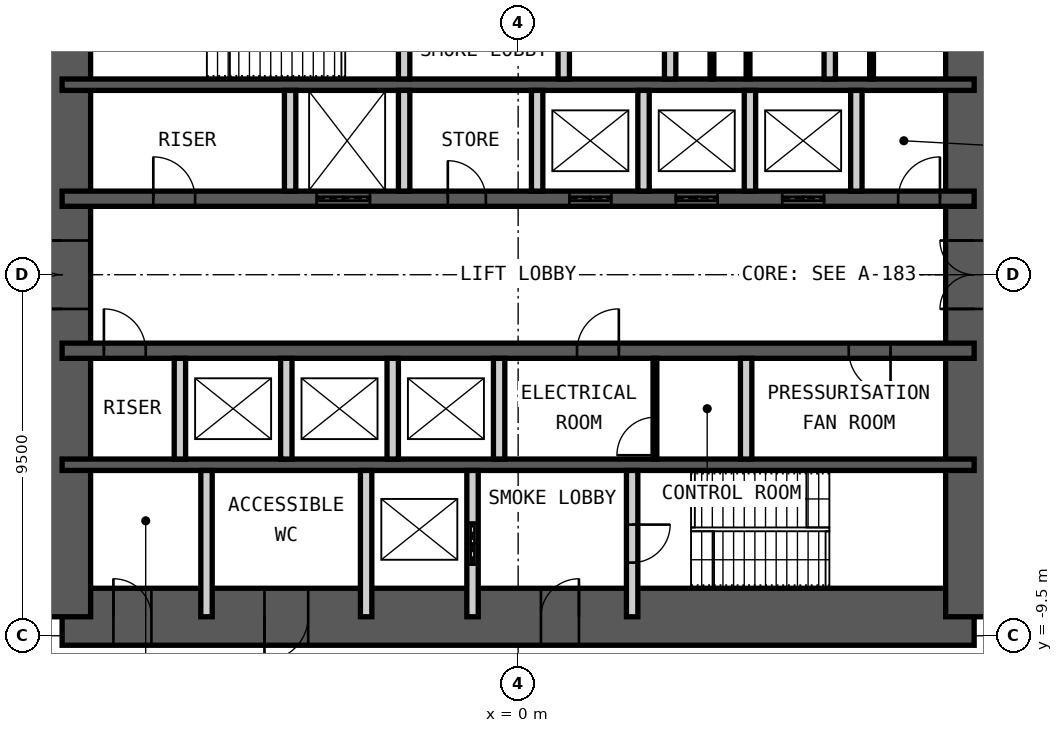
"""IFC4 building model, lengths in metres.
Left out: names, types, materials, properties, quantities, classifications, styles, units other than length and angle.
Written with IfcOpenShell. Run it as: python <this file> out.ifc"""

import sys

from ifc_helpers import new_model, si_unit, direction, frame, frame_2d, origin, place, context, subcontext, project, spatial, rectangle, extrude, element, fill, save


model = new_model("IFC4")
c1 = context("Model", 3, precision=1e-05, world=origin(), true_north=direction((0.0, 1.0)))
c2 = subcontext(c1, "Body", "Model", "MODEL_VIEW")
j1 = project(units=[si_unit("LENGTHUNIT", "METRE"), si_unit("PLANEANGLEUNIT", "RADIAN")], contexts=[c1])
p1 = place(None, origin())
s1 = spatial("IfcSite", under=j1, at=p1, CompositionType="ELEMENT")
p2 = place(p1, origin())
s2 = spatial("IfcBuilding", under=s1, at=p2, CompositionType="ELEMENT")
p3 = place(p2, frame((0.0, 0.0, 82.0)))
s3 = spatial("IfcBuildingStorey", under=s2, at=p3, CompositionType="ELEMENT", Elevation=82.0)
p4 = place(p3, frame((-12.0, -9.0, 0.0), z_axis=(0.0, 0.0, 1.0), x_axis=(1.0, 0.0, 0.0)))
e1 = element("IfcWall", 1, at=p4, inside=s3, PredefinedType="SHEAR", context=c2, shape_type="SweptSolid", body=[
    extrude(rectangle(XDim=24.0, YDim=1.5, at=frame_2d((12.0, 0.0))), origin(), (0.0, 0.0, 1.0), 5.0),
])
p5 = place(p4, frame((1.35, 0.0, 0.0)))
e2 = element("IfcOpeningElement", 2, at=p5, cuts=e1, PredefinedType="OPENING", context=c2, shape_type="SweptSolid", body=[
    extrude(rectangle(XDim=1.0, YDim=2.1, at=frame_2d((0.5, 1.05))), frame((0.0, 0.76, 0.0), z_axis=(0.0, -1.0, 0.0), x_axis=(1.0, 0.0, 0.0)), (0.0, 0.0, 1.0), 1.52),
])
p6 = place(p4, frame((5.325, 0.0, 0.0)))
e3 = element("IfcOpeningElement", 3, at=p6, cuts=e1, PredefinedType="OPENING", context=c2, shape_type="SweptSolid", body=[
    extrude(rectangle(XDim=1.15, YDim=2.1, at=frame_2d((0.575, 1.05))), frame((0.0, 0.76, 0.0), z_axis=(0.0, -1.0, 0.0), x_axis=(1.0, 0.0, 0.0)), (0.0, 0.0, 1.0), 1.52),
])
p7 = place(p4, frame((12.6, 0.0, 0.0)))
e4 = element("IfcOpeningElement", 4, at=p7, cuts=e1, PredefinedType="OPENING", context=c2, shape_type="SweptSolid", body=[
    extrude(rectangle(XDim=1.0, YDim=2.1, at=frame_2d((0.5, 1.05))), frame((0.0, 0.76, 0.0), z_axis=(0.0, -1.0, 0.0), x_axis=(1.0, 0.0, 0.0)), (0.0, 0.0, 1.0), 1.52),
])
p8 = place(p3, frame((12.0, -9.0, 0.0), z_axis=(0.0, 0.0, 1.0), x_axis=(0.0, 1.0, 0.0)))
e5 = element("IfcWall", 5, at=p8, inside=s3, PredefinedType="SHEAR", context=c2, shape_type="SweptSolid", body=[
    extrude(rectangle(XDim=18.0, YDim=1.5, at=frame_2d((9.0, 0.0))), origin(), (0.0, 0.0, 1.0), 5.0),
])
p9 = place(p8, frame((8.1, 0.0, 0.0)))
e6 = element("IfcOpeningElement", 6, at=p9, cuts=e5, PredefinedType="OPENING", context=c2, shape_type="SweptSolid", body=[
    extrude(rectangle(XDim=1.8, YDim=2.1, at=frame_2d((0.9, 1.05))), frame((0.0, 0.76, 0.0), z_axis=(0.0, -1.0, 0.0), x_axis=(1.0, 0.0, 0.0)), (0.0, 0.0, 1.0), 1.52),
])
p10 = place(p3, frame((-12.0, -9.0, 0.0), z_axis=(0.0, 0.0, 1.0), x_axis=(0.0, 1.0, 0.0)))
e7 = element("IfcWall", 7, at=p10, inside=s3, PredefinedType="SHEAR", context=c2, shape_type="SweptSolid", body=[
    extrude(rectangle(XDim=18.0, YDim=1.5, at=frame_2d((9.0, 0.0))), origin(), (0.0, 0.0, 1.0), 5.0),
])
p11 = place(p10, frame((8.1, 0.0, 0.0)))
e8 = element("IfcOpeningElement", 8, at=p11, cuts=e7, PredefinedType="OPENING", context=c2, shape_type="SweptSolid", body=[
    extrude(rectangle(XDim=1.8, YDim=2.1, at=frame_2d((0.9, 1.05))), frame((0.0, 0.76, 0.0), z_axis=(0.0, -1.0, 0.0), x_axis=(1.0, 0.0, 0.0)), (0.0, 0.0, 1.0), 1.52),
])
p12 = place(p3, frame((-12.0, 5.0, 0.0), z_axis=(0.0, 0.0, 1.0), x_axis=(1.0, 0.0, 0.0)))
e9 = element("IfcWall", 9, at=p12, inside=s3, PredefinedType="SHEAR", context=c2, shape_type="SweptSolid", body=[
    extrude(rectangle(XDim=24.0, YDim=0.3, at=frame_2d((12.0, 0.0))), origin(), (0.0, 0.0, 1.0), 5.0),
])
p13 = place(p3, frame((-12.0, 2.0, 0.0), z_axis=(0.0, 0.0, 1.0), x_axis=(1.0, 0.0, 0.0)))
e10 = element("IfcWall", 10, at=p13, inside=s3, PredefinedType="SHEAR", context=c2, shape_type="SweptSolid", body=[
    extrude(rectangle(XDim=24.0, YDim=0.4, at=frame_2d((12.0, 0.0))), origin(), (0.0, 0.0, 1.0), 5.0),
])
p14 = place(p13, frame((2.4, 0.0, 0.0)))
e11 = element("IfcOpeningElement", 11, at=p14, cuts=e10, PredefinedType="OPENING", context=c2, shape_type="SweptSolid", body=[
    extrude(rectangle(XDim=1.1, YDim=2.1, at=frame_2d((0.55, 1.05))), frame((0.0, 0.21, 0.0), z_axis=(0.0, -1.0, 0.0), x_axis=(1.0, 0.0, 0.0)), (0.0, 0.0, 1.0), 0.42),
])
p15 = place(p13, frame((22.0, 0.0, 0.0)))
e12 = element("IfcOpeningElement", 12, at=p15, cuts=e10, PredefinedType="OPENING", context=c2, shape_type="SweptSolid", body=[
    extrude(rectangle(XDim=1.1, YDim=2.1, at=frame_2d((0.55, 1.05))), frame((0.0, 0.21, 0.0), z_axis=(0.0, -1.0, 0.0), x_axis=(1.0, 0.0, 0.0)), (0.0, 0.0, 1.0), 0.42),
])
p16 = place(p13, frame((10.15, 0.0, 0.0)))
e13 = element("IfcOpeningElement", 13, at=p16, cuts=e10, PredefinedType="OPENING", context=c2, shape_type="SweptSolid", body=[
    extrude(rectangle(XDim=1.0, YDim=2.1, at=frame_2d((0.5, 1.05))), frame((0.0, 0.21, 0.0), z_axis=(0.0, -1.0, 0.0), x_axis=(1.0, 0.0, 0.0)), (0.0, 0.0, 1.0), 0.42),
])
p17 = place(p13, frame((6.7, 0.0, 0.0)))
e14 = element("IfcOpeningElement", 14, at=p17, cuts=e10, PredefinedType="OPENING", context=c2, shape_type="SweptSolid", body=[
    extrude(rectangle(XDim=1.4, YDim=2.4, at=frame_2d((0.7, 1.2))), frame((0.0, 0.21, 0.0), z_axis=(0.0, -1.0, 0.0), x_axis=(1.0, 0.0, 0.0)), (0.0, 0.0, 1.0), 0.42),
])
p18 = place(p13, frame((13.35, 0.0, 0.0)))
e15 = element("IfcOpeningElement", 15, at=p18, cuts=e10, PredefinedType="OPENING", context=c2, shape_type="SweptSolid", body=[
    extrude(rectangle(XDim=1.1, YDim=2.4, at=frame_2d((0.55, 1.2))), frame((0.0, 0.21, 0.0), z_axis=(0.0, -1.0, 0.0), x_axis=(1.0, 0.0, 0.0)), (0.0, 0.0, 1.0), 0.42),
])
p19 = place(p13, frame((16.15, 0.0, 0.0)))
e16 = element("IfcOpeningElement", 16, at=p19, cuts=e10, PredefinedType="OPENING", context=c2, shape_type="SweptSolid", body=[
    extrude(rectangle(XDim=1.1, YDim=2.4, at=frame_2d((0.55, 1.2))), frame((0.0, 0.21, 0.0), z_axis=(0.0, -1.0, 0.0), x_axis=(1.0, 0.0, 0.0)), (0.0, 0.0, 1.0), 0.42),
])
p20 = place(p13, frame((18.95, 0.0, 0.0)))
e17 = element("IfcOpeningElement", 17, at=p20, cuts=e10, PredefinedType="OPENING", context=c2, shape_type="SweptSolid", body=[
    extrude(rectangle(XDim=1.1, YDim=2.4, at=frame_2d((0.55, 1.2))), frame((0.0, 0.21, 0.0), z_axis=(0.0, -1.0, 0.0), x_axis=(1.0, 0.0, 0.0)), (0.0, 0.0, 1.0), 0.42),
])
p21 = place(p3, frame((-12.0, -2.0, 0.0), z_axis=(0.0, 0.0, 1.0), x_axis=(1.0, 0.0, 0.0)))
e18 = element("IfcWall", 18, at=p21, inside=s3, PredefinedType="SHEAR", context=c2, shape_type="SweptSolid", body=[
    extrude(rectangle(XDim=24.0, YDim=0.4, at=frame_2d((12.0, 0.0))), origin(), (0.0, 0.0, 1.0), 5.0),
])
p22 = place(p21, frame((1.1, 0.0, 0.0)))
e19 = element("IfcOpeningElement", 19, at=p22, cuts=e18, PredefinedType="OPENING", context=c2, shape_type="SweptSolid", body=[
    extrude(rectangle(XDim=1.1, YDim=2.1, at=frame_2d((0.55, 1.05))), frame((0.0, 0.21, 0.0), z_axis=(0.0, -1.0, 0.0), x_axis=(1.0, 0.0, 0.0)), (0.0, 0.0, 1.0), 0.42),
])
p23 = place(p21, frame((13.55, 0.0, 0.0)))
e20 = element("IfcOpeningElement", 20, at=p23, cuts=e18, PredefinedType="OPENING", context=c2, shape_type="SweptSolid", body=[
    extrude(rectangle(XDim=1.1, YDim=2.1, at=frame_2d((0.55, 1.05))), frame((0.0, 0.21, 0.0), z_axis=(0.0, -1.0, 0.0), x_axis=(1.0, 0.0, 0.0)), (0.0, 0.0, 1.0), 0.42),
])
p24 = place(p21, frame((20.7, 0.0, 0.0)))
e21 = element("IfcOpeningElement", 21, at=p24, cuts=e18, PredefinedType="OPENING", context=c2, shape_type="SweptSolid", body=[
    extrude(rectangle(XDim=1.1, YDim=2.1, at=frame_2d((0.55, 1.05))), frame((0.0, 0.21, 0.0), z_axis=(0.0, -1.0, 0.0), x_axis=(1.0, 0.0, 0.0)), (0.0, 0.0, 1.0), 0.42),
])
p25 = place(p3, frame((-12.0, -5.0, 0.0), z_axis=(0.0, 0.0, 1.0), x_axis=(1.0, 0.0, 0.0)))
e22 = element("IfcWall", 22, at=p25, inside=s3, PredefinedType="SHEAR", context=c2, shape_type="SweptSolid", body=[
    extrude(rectangle(XDim=24.0, YDim=0.3, at=frame_2d((12.0, 0.0))), origin(), (0.0, 0.0, 1.0), 5.0),
])
p26 = place(p3, frame((-3.0, 5.15, 0.0), z_axis=(0.0, 0.0, 1.0), x_axis=(0.0, 1.0, 0.0)))
e23 = element("IfcWall", 23, at=p26, inside=s3, PredefinedType="PARTITIONING", context=c2, shape_type="SweptSolid", body=[
    extrude(rectangle(XDim=3.85, YDim=0.3, at=frame_2d((1.925, 0.0))), origin(), (0.0, 0.0, 1.0), 4.78),
])
p27 = place(p26, frame((1.425, 0.0, 0.0)))
e24 = element("IfcOpeningElement", 24, at=p27, cuts=e23, PredefinedType="OPENING", context=c2, shape_type="SweptSolid", body=[
    extrude(rectangle(XDim=1.0, YDim=2.1, at=frame_2d((0.5, 1.05))), frame((0.0, 0.16, 0.0), z_axis=(0.0, -1.0, 0.0), x_axis=(1.0, 0.0, 0.0)), (0.0, 0.0, 1.0), 0.32),
])
p28 = place(p3, frame((1.2, 5.15, 0.0), z_axis=(0.0, 0.0, 1.0), x_axis=(0.0, 1.0, 0.0)))
e25 = element("IfcWall", 25, at=p28, inside=s3, PredefinedType="PARTITIONING", context=c2, shape_type="SweptSolid", body=[
    extrude(rectangle(XDim=3.85, YDim=0.3, at=frame_2d((1.925, 0.0))), origin(), (0.0, 0.0, 1.0), 4.78),
])
p29 = place(p28, frame((1.375, 0.0, 0.0)))
e26 = element("IfcOpeningElement", 26, at=p29, cuts=e25, PredefinedType="OPENING", context=c2, shape_type="SweptSolid", body=[
    extrude(rectangle(XDim=1.1, YDim=2.4, at=frame_2d((0.55, 1.2))), frame((0.0, 0.16, 0.0), z_axis=(0.0, -1.0, 0.0), x_axis=(1.0, 0.0, 0.0)), (0.0, 0.0, 1.0), 0.32),
])
for number, where, z_axis, x_axis in (
    (27, (4.0, 5.15, 0.0), (0.0, 0.0, 1.0), (0.0, 1.0, 0.0)),
    (28, (8.2, 5.15, 0.0), (0.0, 0.0, 1.0), (0.0, 1.0, 0.0)),
):
    element("IfcWall", number, at=place(p3, frame(where, z_axis=z_axis, x_axis=x_axis)), inside=s3, PredefinedType="PARTITIONING", context=c2, shape_type="SweptSolid", body=[
        extrude(rectangle(XDim=3.85, YDim=0.3, at=frame_2d((1.925, 0.0))), origin(), (0.0, 0.0, 1.0), 4.78),
    ])
for number, where, z_axis, x_axis in (
    (29, (-6.0, 2.2, 0.0), (0.0, 0.0, 1.0), (0.0, 1.0, 0.0)),
    (30, (-3.0, 2.2, 0.0), (0.0, 0.0, 1.0), (0.0, 1.0, 0.0)),
    (31, (0.5, 2.2, 0.0), (0.0, 0.0, 1.0), (0.0, 1.0, 0.0)),
    (32, (3.3, 2.2, 0.0), (0.0, 0.0, 1.0), (0.0, 1.0, 0.0)),
    (33, (6.1, 2.2, 0.0), (0.0, 0.0, 1.0), (0.0, 1.0, 0.0)),
    (34, (8.9, 2.2, 0.0), (0.0, 0.0, 1.0), (0.0, 1.0, 0.0)),
    (35, (-8.9, -4.85, 0.0), (0.0, 0.0, 1.0), (0.0, 1.0, 0.0)),
    (36, (-6.1, -4.85, 0.0), (0.0, 0.0, 1.0), (0.0, 1.0, 0.0)),
    (37, (-3.3, -4.85, 0.0), (0.0, 0.0, 1.0), (0.0, 1.0, 0.0)),
    (38, (-0.5, -4.85, 0.0), (0.0, 0.0, 1.0), (0.0, 1.0, 0.0)),
    (39, (6.0, -4.85, 0.0), (0.0, 0.0, 1.0), (0.0, 1.0, 0.0)),
):
    element("IfcWall", number, at=place(p3, frame(where, z_axis=z_axis, x_axis=x_axis)), inside=s3, PredefinedType="PARTITIONING", context=c2, shape_type="SweptSolid", body=[
        extrude(rectangle(XDim=2.65, YDim=0.3, at=frame_2d((1.325, 0.0))), origin(), (0.0, 0.0, 1.0), 4.78),
    ])
for number, where, z_axis, x_axis in (
    (40, (-8.2, -9.0, 0.0), (0.0, 0.0, 1.0), (0.0, 1.0, 0.0)),
    (41, (-4.0, -9.0, 0.0), (0.0, 0.0, 1.0), (0.0, 1.0, 0.0)),
):
    element("IfcWall", number, at=place(p3, frame(where, z_axis=z_axis, x_axis=x_axis)), inside=s3, PredefinedType="PARTITIONING", context=c2, shape_type="SweptSolid", body=[
        extrude(rectangle(XDim=3.85, YDim=0.3, at=frame_2d((1.925, 0.0))), origin(), (0.0, 0.0, 1.0), 4.78),
    ])
p30 = place(p3, frame((-1.2, -9.0, 0.0), z_axis=(0.0, 0.0, 1.0), x_axis=(0.0, 1.0, 0.0)))
e42 = element("IfcWall", 42, at=p30, inside=s3, PredefinedType="PARTITIONING", context=c2, shape_type="SweptSolid", body=[
    extrude(rectangle(XDim=3.85, YDim=0.3, at=frame_2d((1.925, 0.0))), origin(), (0.0, 0.0, 1.0), 4.78),
])
p31 = place(p30, frame((1.375, 0.0, 0.0)))
e43 = element("IfcOpeningElement", 43, at=p31, cuts=e42, PredefinedType="OPENING", context=c2, shape_type="SweptSolid", body=[
    extrude(rectangle(XDim=1.1, YDim=2.4, at=frame_2d((0.55, 1.2))), frame((0.0, 0.16, 0.0), z_axis=(0.0, -1.0, 0.0), x_axis=(1.0, 0.0, 0.0)), (0.0, 0.0, 1.0), 0.32),
])
p32 = place(p3, frame((3.0, -9.0, 0.0), z_axis=(0.0, 0.0, 1.0), x_axis=(0.0, 1.0, 0.0)))
e44 = element("IfcWall", 44, at=p32, inside=s3, PredefinedType="PARTITIONING", context=c2, shape_type="SweptSolid", body=[
    extrude(rectangle(XDim=3.85, YDim=0.3, at=frame_2d((1.925, 0.0))), origin(), (0.0, 0.0, 1.0), 4.78),
])
p33 = place(p32, frame((1.425, 0.0, 0.0)))
e45 = element("IfcOpeningElement", 45, at=p33, cuts=e44, PredefinedType="OPENING", context=c2, shape_type="SweptSolid", body=[
    extrude(rectangle(XDim=1.0, YDim=2.1, at=frame_2d((0.5, 1.05))), frame((0.0, 0.16, 0.0), z_axis=(0.0, -1.0, 0.0), x_axis=(1.0, 0.0, 0.0)), (0.0, 0.0, 1.0), 0.32),
])
p34 = place(p3, frame((3.6, -4.85, 0.0), z_axis=(0.0, 0.0, 1.0), x_axis=(0.0, 1.0, 0.0)))
e46 = element("IfcWall", 46, at=p34, inside=s3, PredefinedType="PARTITIONING", context=c2, shape_type="SweptSolid", body=[
    extrude(rectangle(XDim=2.65, YDim=0.1, at=frame_2d((1.325, 0.0))), origin(), (0.0, 0.0, 1.0), 4.78),
])
p35 = place(p34, frame((0.1, 0.0, 0.0)))
e47 = element("IfcOpeningElement", 47, at=p35, cuts=e46, PredefinedType="OPENING", context=c2, shape_type="SweptSolid", body=[
    extrude(rectangle(XDim=1.0, YDim=2.4, at=frame_2d((0.5, 1.2))), frame((0.0, 0.06, 0.0), z_axis=(0.0, -1.0, 0.0), x_axis=(1.0, 0.0, 0.0)), (0.0, 0.0, 1.0), 0.12),
])
for number, where, z_axis, x_axis in (
    (48, (5.1, 5.15, 0.0), (0.0, 0.0, 1.0), (0.0, 1.0, 0.0)),
    (49, (6.05, 5.15, 0.0), (0.0, 0.0, 1.0), (0.0, 1.0, 0.0)),
    (50, (9.3, 5.15, 0.0), (0.0, 0.0, 1.0), (0.0, 1.0, 0.0)),
):
    element("IfcWall", number, at=place(p3, frame(where, z_axis=z_axis, x_axis=x_axis)), inside=s3, PredefinedType="PARTITIONING", context=c2, shape_type="SweptSolid", body=[
        extrude(rectangle(XDim=1.5, YDim=0.1, at=frame_2d((0.75, 0.0))), origin(), (0.0, 0.0, 1.0), 2.1),
    ])
p36 = place(p5, origin())
e51 = element("IfcDoor", 51, at=p36, inside=s3, OperationType="SINGLE_SWING_RIGHT", PredefinedType="DOOR", context=c2, shape_type="SweptSolid", body=[
    extrude(rectangle(XDim=1.0, YDim=2.1, at=frame_2d((0.5, 1.05))), frame((0.0, 0.025, 0.0), z_axis=(0.0, -1.0, 0.0), x_axis=(1.0, 0.0, 0.0)), (0.0, 0.0, 1.0), 0.05),
])
fill(e2, e51)
p37 = place(p6, origin())
e52 = element("IfcDoor", 52, at=p37, inside=s3, OperationType="SINGLE_SWING_LEFT", PredefinedType="DOOR", context=c2, shape_type="SweptSolid", body=[
    extrude(rectangle(XDim=1.15, YDim=2.1, at=frame_2d((0.575, 1.05))), frame((0.0, 0.025, 0.0), z_axis=(0.0, -1.0, 0.0), x_axis=(1.0, 0.0, 0.0)), (0.0, 0.0, 1.0), 0.05),
])
fill(e3, e52)
p38 = place(p7, origin())
e53 = element("IfcDoor", 53, at=p38, inside=s3, OperationType="SINGLE_SWING_LEFT", PredefinedType="DOOR", context=c2, shape_type="SweptSolid", body=[
    extrude(rectangle(XDim=1.0, YDim=2.1, at=frame_2d((0.5, 1.05))), frame((0.0, 0.025, 0.0), z_axis=(0.0, -1.0, 0.0), x_axis=(1.0, 0.0, 0.0)), (0.0, 0.0, 1.0), 0.05),
])
fill(e4, e53)
p39 = place(p33, origin())
e54 = element("IfcDoor", 54, at=p39, inside=s3, OperationType="SINGLE_SWING_RIGHT", PredefinedType="DOOR", context=c2, shape_type="SweptSolid", body=[
    extrude(rectangle(XDim=1.0, YDim=2.1, at=frame_2d((0.5, 1.05))), frame((0.0, 0.025, 0.0), z_axis=(0.0, -1.0, 0.0), x_axis=(1.0, 0.0, 0.0)), (0.0, 0.0, 1.0), 0.05),
])
fill(e45, e54)
p40 = place(p14, origin())
e55 = element("IfcDoor", 55, at=p40, inside=s3, OperationType="SINGLE_SWING_RIGHT", PredefinedType="DOOR", context=c2, shape_type="SweptSolid", body=[
    extrude(rectangle(XDim=1.1, YDim=2.1, at=frame_2d((0.55, 1.05))), frame((0.0, 0.025, 0.0), z_axis=(0.0, -1.0, 0.0), x_axis=(1.0, 0.0, 0.0)), (0.0, 0.0, 1.0), 0.05),
])
fill(e11, e55)
p41 = place(p22, origin())
e56 = element("IfcDoor", 56, at=p41, inside=s3, OperationType="SINGLE_SWING_RIGHT", PredefinedType="DOOR", context=c2, shape_type="SweptSolid", body=[
    extrude(rectangle(XDim=1.1, YDim=2.1, at=frame_2d((0.55, 1.05))), frame((0.0, 0.025, 0.0), z_axis=(0.0, -1.0, 0.0), x_axis=(1.0, 0.0, 0.0)), (0.0, 0.0, 1.0), 0.05),
])
fill(e19, e56)
p42 = place(p15, origin())
e57 = element("IfcDoor", 57, at=p42, inside=s3, OperationType="SINGLE_SWING_LEFT", PredefinedType="DOOR", context=c2, shape_type="SweptSolid", body=[
    extrude(rectangle(XDim=1.1, YDim=2.1, at=frame_2d((0.55, 1.05))), frame((0.0, 0.025, 0.0), z_axis=(0.0, -1.0, 0.0), x_axis=(1.0, 0.0, 0.0)), (0.0, 0.0, 1.0), 0.05),
])
fill(e12, e57)
p43 = place(p16, origin())
e58 = element("IfcDoor", 58, at=p43, inside=s3, OperationType="SINGLE_SWING_RIGHT", PredefinedType="DOOR", context=c2, shape_type="SweptSolid", body=[
    extrude(rectangle(XDim=1.0, YDim=2.1, at=frame_2d((0.5, 1.05))), frame((0.0, 0.025, 0.0), z_axis=(0.0, -1.0, 0.0), x_axis=(1.0, 0.0, 0.0)), (0.0, 0.0, 1.0), 0.05),
])
fill(e13, e58)
p44 = place(p23, origin())
e59 = element("IfcDoor", 59, at=p44, inside=s3, OperationType="SINGLE_SWING_LEFT", PredefinedType="DOOR", context=c2, shape_type="SweptSolid", body=[
    extrude(rectangle(XDim=1.1, YDim=2.1, at=frame_2d((0.55, 1.05))), frame((0.0, 0.025, 0.0), z_axis=(0.0, -1.0, 0.0), x_axis=(1.0, 0.0, 0.0)), (0.0, 0.0, 1.0), 0.05),
])
fill(e20, e59)
p45 = place(p24, origin())
e60 = element("IfcDoor", 60, at=p45, inside=s3, OperationType="SINGLE_SWING_RIGHT", PredefinedType="DOOR", context=c2, shape_type="SweptSolid", body=[
    extrude(rectangle(XDim=1.1, YDim=2.1, at=frame_2d((0.55, 1.05))), frame((0.0, 0.025, 0.0), z_axis=(0.0, -1.0, 0.0), x_axis=(1.0, 0.0, 0.0)), (0.0, 0.0, 1.0), 0.05),
])
fill(e21, e60)
p46 = place(p9, origin())
e61 = element("IfcDoor", 61, at=p46, inside=s3, OperationType="DOUBLE_DOOR_DOUBLE_SWING", PredefinedType="DOOR", context=c2, shape_type="SweptSolid", body=[
    extrude(rectangle(XDim=1.8, YDim=2.1, at=frame_2d((0.9, 1.05))), frame((0.0, 0.025, 0.0), z_axis=(0.0, -1.0, 0.0), x_axis=(1.0, 0.0, 0.0)), (0.0, 0.0, 1.0), 0.05),
])
fill(e6, e61)
p47 = place(p11, origin())
e62 = element("IfcDoor", 62, at=p47, inside=s3, OperationType="DOUBLE_DOOR_DOUBLE_SWING", PredefinedType="DOOR", context=c2, shape_type="SweptSolid", body=[
    extrude(rectangle(XDim=1.8, YDim=2.1, at=frame_2d((0.9, 1.05))), frame((0.0, 0.025, 0.0), z_axis=(0.0, -1.0, 0.0), x_axis=(1.0, 0.0, 0.0)), (0.0, 0.0, 1.0), 0.05),
])
fill(e8, e62)
p48 = place(p31, origin())
e63 = element("IfcDoor", 63, at=p48, inside=s3, OperationType="DOUBLE_DOOR_SLIDING", PredefinedType="DOOR", context=c2, shape_type="SweptSolid", body=[
    extrude(rectangle(XDim=1.1, YDim=2.4, at=frame_2d((0.55, 1.2))), frame((0.0, 0.025, 0.0), z_axis=(0.0, -1.0, 0.0), x_axis=(1.0, 0.0, 0.0)), (0.0, 0.0, 1.0), 0.05),
])
fill(e43, e63)
p49 = place(p17, origin())
e64 = element("IfcDoor", 64, at=p49, inside=s3, OperationType="DOUBLE_DOOR_SLIDING", PredefinedType="DOOR", context=c2, shape_type="SweptSolid", body=[
    extrude(rectangle(XDim=1.4, YDim=2.4, at=frame_2d((0.7, 1.2))), frame((0.0, 0.025, 0.0), z_axis=(0.0, -1.0, 0.0), x_axis=(1.0, 0.0, 0.0)), (0.0, 0.0, 1.0), 0.05),
])
fill(e14, e64)
p50 = place(p18, origin())
e65 = element("IfcDoor", 65, at=p50, inside=s3, OperationType="DOUBLE_DOOR_SLIDING", PredefinedType="DOOR", context=c2, shape_type="SweptSolid", body=[
    extrude(rectangle(XDim=1.1, YDim=2.4, at=frame_2d((0.55, 1.2))), frame((0.0, 0.025, 0.0), z_axis=(0.0, -1.0, 0.0), x_axis=(1.0, 0.0, 0.0)), (0.0, 0.0, 1.0), 0.05),
])
fill(e15, e65)
p51 = place(p19, origin())
e66 = element("IfcDoor", 66, at=p51, inside=s3, OperationType="DOUBLE_DOOR_SLIDING", PredefinedType="DOOR", context=c2, shape_type="SweptSolid", body=[
    extrude(rectangle(XDim=1.1, YDim=2.4, at=frame_2d((0.55, 1.2))), frame((0.0, 0.025, 0.0), z_axis=(0.0, -1.0, 0.0), x_axis=(1.0, 0.0, 0.0)), (0.0, 0.0, 1.0), 0.05),
])
fill(e16, e66)
p52 = place(p20, origin())
e67 = element("IfcDoor", 67, at=p52, inside=s3, OperationType="DOUBLE_DOOR_SLIDING", PredefinedType="DOOR", context=c2, shape_type="SweptSolid", body=[
    extrude(rectangle(XDim=1.1, YDim=2.4, at=frame_2d((0.55, 1.2))), frame((0.0, 0.025, 0.0), z_axis=(0.0, -1.0, 0.0), x_axis=(1.0, 0.0, 0.0)), (0.0, 0.0, 1.0), 0.05),
])
fill(e17, e67)
p53 = place(p35, origin())
e68 = element("IfcDoor", 68, at=p53, inside=s3, OperationType="SINGLE_SWING_RIGHT", PredefinedType="DOOR", context=c2, shape_type="SweptSolid", body=[
    extrude(rectangle(XDim=1.0, YDim=2.4, at=frame_2d((0.5, 1.2))), frame((0.0, 0.025, 0.0), z_axis=(0.0, -1.0, 0.0), x_axis=(1.0, 0.0, 0.0)), (0.0, 0.0, 1.0), 0.05),
])
fill(e47, e68)
save(model, sys.argv[1])
